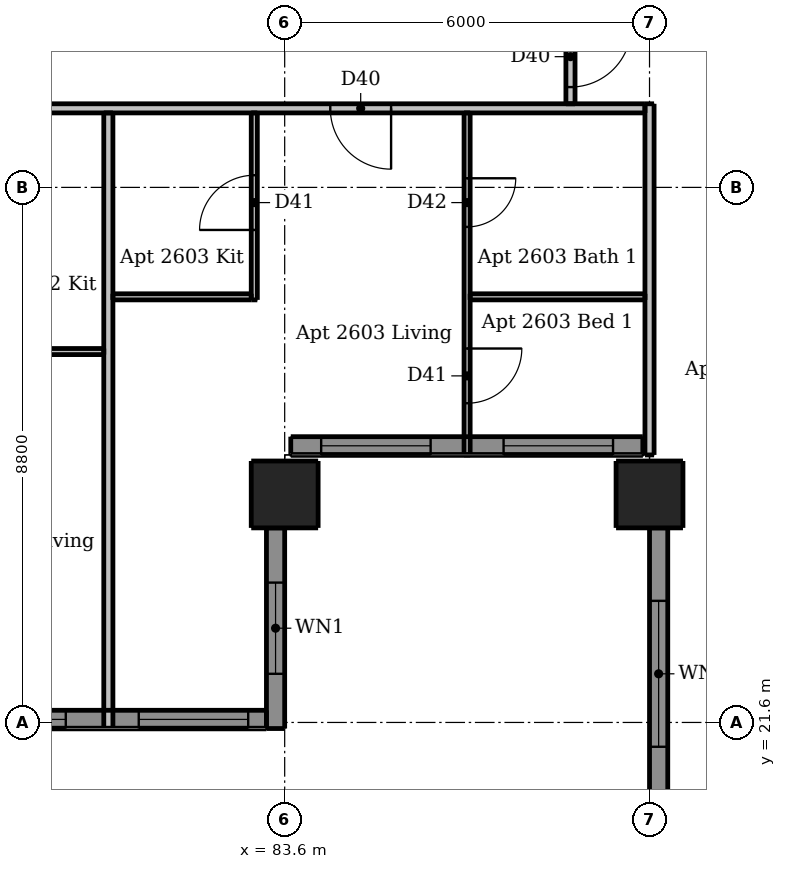
"""IFC4 building model, lengths in metres.
Left out: names, types, materials, properties, quantities, classifications, styles, units other than length and angle.
Written with IfcOpenShell. Run it as: python <this file> out.ifc"""

import sys

from ifc_helpers import new_model, si_unit, direction, frame, frame_2d, origin, origin_2d, place, context, subcontext, project, spatial, rectangle, extrude, element, fill, save


model = new_model("IFC4")
c1 = context("Model", 3, precision=1e-05, world=origin(), true_north=direction((0.0, 1.0)))
c2 = subcontext(c1, "Body", "Model", "MODEL_VIEW")
j1 = project(units=[si_unit("LENGTHUNIT", "METRE"), si_unit("PLANEANGLEUNIT", "RADIAN")], contexts=[c1])
p1 = place(None, origin())
s1 = spatial("IfcSite", under=j1, at=p1, CompositionType="ELEMENT")
p2 = place(p1, origin())
s2 = spatial("IfcBuilding", under=s1, at=p2, CompositionType="ELEMENT")
p3 = place(p2, frame((0.0, 0.0, 98.5)))
s3 = spatial("IfcBuildingStorey", under=s2, at=p3, CompositionType="ELEMENT", Elevation=98.5)
for number, where, z_axis, x_axis in (
    (1, (83.6, 25.35, 0.0), (0.0, 0.0, 1.0), (1.0, 0.0, 0.0)),
    (2, (89.6, 25.35, 0.0), (0.0, 0.0, 1.0), (1.0, 0.0, 0.0)),
):
    element("IfcColumn", number, at=place(p3, frame(where, z_axis=z_axis, x_axis=x_axis)), inside=s3, PredefinedType="COLUMN", context=c2, shape_type="SweptSolid", body=[
        extrude(rectangle(XDim=1.1, YDim=1.1, at=origin_2d()), origin(), (0.0, 0.0, 1.0), 3.05),
    ])
p4 = place(p3, frame((83.45, 21.5, 0.0), z_axis=(0.0, 0.0, 1.0), x_axis=(0.0, 1.0, 0.0)))
e3 = element("IfcWall", 3, at=p4, inside=s3, PredefinedType="SOLIDWALL", context=c2, shape_type="SweptSolid", body=[
    extrude(rectangle(XDim=3.3, YDim=0.3, at=frame_2d((1.65, 0.0))), origin(), (0.0, 0.0, 1.0), 3.05),
])
p5 = place(p4, frame((0.9, 0.0, 0.9)))
e4 = element("IfcOpeningElement", 4, at=p5, cuts=e3, PredefinedType="OPENING", context=c2, shape_type="SweptSolid", body=[
    extrude(rectangle(XDim=1.5, YDim=1.5, at=frame_2d((0.75, 0.75))), frame((0.0, 0.16, 0.0), z_axis=(0.0, -1.0, 0.0), x_axis=(1.0, 0.0, 0.0)), (0.0, 0.0, 1.0), 0.32),
])
p6 = place(p3, frame((89.75, 24.8, 0.0), z_axis=(0.0, 0.0, 1.0), x_axis=(0.0, -1.0, 0.0)))
e5 = element("IfcWall", 5, at=p6, inside=s3, PredefinedType="SOLIDWALL", context=c2, shape_type="SweptSolid", body=[
    extrude(rectangle(XDim=4.8, YDim=0.3, at=frame_2d((2.4, 0.0))), origin(), (0.0, 0.0, 1.0), 3.05),
])
p7 = place(p6, frame((1.2, 0.0, 0.15)))
e6 = element("IfcOpeningElement", 6, at=p7, cuts=e5, PredefinedType="OPENING", context=c2, shape_type="SweptSolid", body=[
    extrude(rectangle(XDim=2.4, YDim=2.1, at=frame_2d((1.2, 1.05))), frame((0.0, 0.16, 0.0), z_axis=(0.0, -1.0, 0.0), x_axis=(1.0, 0.0, 0.0)), (0.0, 0.0, 1.0), 0.32),
])
p8 = place(p3, frame((77.6, 21.65, 0.0), z_axis=(0.0, 0.0, 1.0), x_axis=(1.0, 0.0, 0.0)))
e7 = element("IfcWall", 7, at=p8, inside=s3, PredefinedType="SOLIDWALL", context=c2, shape_type="SweptSolid", body=[
    extrude(rectangle(XDim=5.7, YDim=0.3, at=frame_2d((2.85, 0.0))), origin(), (0.0, 0.0, 1.0), 3.05),
])
p9 = place(p8, frame((0.6, 0.0, 0.15)))
e8 = element("IfcOpeningElement", 8, at=p9, cuts=e7, PredefinedType="OPENING", context=c2, shape_type="SweptSolid", body=[
    extrude(rectangle(XDim=1.8, YDim=2.1, at=frame_2d((0.9, 1.05))), frame((0.0, 0.16, 0.0), z_axis=(0.0, -1.0, 0.0), x_axis=(1.0, 0.0, 0.0)), (0.0, 0.0, 1.0), 0.32),
])
p10 = place(p8, frame((3.6, 0.0, 0.15)))
e9 = element("IfcOpeningElement", 9, at=p10, cuts=e7, PredefinedType="OPENING", context=c2, shape_type="SweptSolid", body=[
    extrude(rectangle(XDim=1.8, YDim=2.1, at=frame_2d((0.9, 1.05))), frame((0.0, 0.16, 0.0), z_axis=(0.0, -1.0, 0.0), x_axis=(1.0, 0.0, 0.0)), (0.0, 0.0, 1.0), 0.32),
])
p11 = place(p3, frame((83.7, 26.15, 0.0), z_axis=(0.0, 0.0, 1.0), x_axis=(1.0, 0.0, 0.0)))
e10 = element("IfcWall", 10, at=p11, inside=s3, PredefinedType="SOLIDWALL", context=c2, shape_type="SweptSolid", body=[
    extrude(rectangle(XDim=5.79, YDim=0.3, at=frame_2d((2.895, 0.0))), origin(), (0.0, 0.0, 1.0), 3.05),
])
p12 = place(p11, frame((0.5, 0.0, 0.15)))
e11 = element("IfcOpeningElement", 11, at=p12, cuts=e10, PredefinedType="OPENING", context=c2, shape_type="SweptSolid", body=[
    extrude(rectangle(XDim=1.8, YDim=2.1, at=frame_2d((0.9, 1.05))), frame((0.0, 0.16, 0.0), z_axis=(0.0, -1.0, 0.0), x_axis=(1.0, 0.0, 0.0)), (0.0, 0.0, 1.0), 0.32),
])
p13 = place(p11, frame((3.5, 0.0, 0.15)))
e12 = element("IfcOpeningElement", 12, at=p13, cuts=e10, PredefinedType="OPENING", context=c2, shape_type="SweptSolid", body=[
    extrude(rectangle(XDim=1.8, YDim=2.1, at=frame_2d((0.9, 1.05))), frame((0.0, 0.16, 0.0), z_axis=(0.0, -1.0, 0.0), x_axis=(1.0, 0.0, 0.0)), (0.0, 0.0, 1.0), 0.32),
])
p14 = place(p3, frame((83.1, 28.55, 0.0), z_axis=(0.0, 0.0, 1.0), x_axis=(0.0, 1.0, 0.0)))
e13 = element("IfcWall", 13, at=p14, inside=s3, PredefinedType="PARTITIONING", context=c2, shape_type="SweptSolid", body=[
    extrude(rectangle(XDim=3.075, YDim=0.1, at=frame_2d((1.538, 0.0))), origin(), (0.0, 0.0, 1.0), 3.05),
])
p15 = place(p14, frame((1.15, 0.0, 0.0)))
e14 = element("IfcOpeningElement", 14, at=p15, cuts=e13, PredefinedType="OPENING", context=c2, shape_type="SweptSolid", body=[
    extrude(rectangle(XDim=0.9, YDim=2.1, at=frame_2d((0.45, 1.05))), frame((0.0, 0.06, 0.0), z_axis=(0.0, -1.0, 0.0), x_axis=(1.0, 0.0, 0.0)), (0.0, 0.0, 1.0), 0.12),
])
p16 = place(p3, frame((86.6, 31.625, 0.0), z_axis=(0.0, 0.0, 1.0), x_axis=(0.0, -1.0, 0.0)))
e15 = element("IfcWall", 15, at=p16, inside=s3, PredefinedType="PARTITIONING", context=c2, shape_type="SweptSolid", body=[
    extrude(rectangle(XDim=5.625, YDim=0.1, at=frame_2d((2.812, 0.0))), origin(), (0.0, 0.0, 1.0), 3.05),
])
p17 = place(p16, frame((3.875, 0.0, 0.0)))
e16 = element("IfcOpeningElement", 16, at=p17, cuts=e15, PredefinedType="OPENING", context=c2, shape_type="SweptSolid", body=[
    extrude(rectangle(XDim=0.9, YDim=2.1, at=frame_2d((0.45, 1.05))), frame((0.0, 0.06, 0.0), z_axis=(0.0, -1.0, 0.0), x_axis=(1.0, 0.0, 0.0)), (0.0, 0.0, 1.0), 0.12),
])
p18 = place(p16, frame((1.075, 0.0, 0.0)))
e17 = element("IfcOpeningElement", 17, at=p18, cuts=e15, PredefinedType="OPENING", context=c2, shape_type="SweptSolid", body=[
    extrude(rectangle(XDim=0.8, YDim=2.1, at=frame_2d((0.4, 1.05))), frame((0.0, 0.06, 0.0), z_axis=(0.0, -1.0, 0.0), x_axis=(1.0, 0.0, 0.0)), (0.0, 0.0, 1.0), 0.12),
])
p19 = place(p3, frame((80.775, 28.6, 0.0), z_axis=(0.0, 0.0, 1.0), x_axis=(1.0, 0.0, 0.0)))
e18 = element("IfcWall", 18, at=p19, inside=s3, PredefinedType="PARTITIONING", context=c2, shape_type="SweptSolid", body=[
    extrude(rectangle(XDim=2.275, YDim=0.1, at=frame_2d((1.138, 0.0))), origin(), (0.0, 0.0, 1.0), 3.05),
])
p20 = place(p3, frame((86.65, 28.6, 0.0), z_axis=(0.0, 0.0, 1.0), x_axis=(1.0, 0.0, 0.0)))
e19 = element("IfcWall", 19, at=p20, inside=s3, PredefinedType="PARTITIONING", context=c2, shape_type="SweptSolid", body=[
    extrude(rectangle(XDim=2.875, YDim=0.1, at=frame_2d((1.438, 0.0))), origin(), (0.0, 0.0, 1.0), 3.05),
])
p21 = place(p3, frame((78.35, 27.7, 0.0), z_axis=(0.0, 0.0, 1.0), x_axis=(1.0, 0.0, 0.0)))
e20 = element("IfcWall", 20, at=p21, inside=s3, PredefinedType="PARTITIONING", context=c2, shape_type="SweptSolid", body=[
    extrude(rectangle(XDim=2.275, YDim=0.1, at=frame_2d((1.137, 0.0))), origin(), (0.0, 0.0, 1.0), 3.05),
])
p22 = place(p3, frame((80.7, 21.5, 0.0), z_axis=(0.0, 0.0, 1.0), x_axis=(0.0, 1.0, 0.0)))
e21 = element("IfcWall", 21, at=p22, inside=s3, PredefinedType="PARTITIONING", context=c2, shape_type="SweptSolid", body=[
    extrude(rectangle(XDim=10.125, YDim=0.15, at=frame_2d((5.062, 0.0))), origin(), (0.0, 0.0, 1.0), 3.05),
])
p23 = place(p3, frame((88.3, 60.475, 0.0), z_axis=(0.0, 0.0, 1.0), x_axis=(0.0, -1.0, 0.0)))
e22 = element("IfcWall", 22, at=p23, inside=s3, PredefinedType="PARTITIONING", context=c2, shape_type="SweptSolid", body=[
    extrude(rectangle(XDim=28.7, YDim=0.15, at=frame_2d((14.35, 0.0))), origin(), (0.0, 0.0, 1.0), 3.05),
])
p24 = place(p23, frame((27.425, 0.0, 0.0)))
e23 = element("IfcOpeningElement", 23, at=p24, cuts=e22, PredefinedType="OPENING", context=c2, shape_type="SweptSolid", body=[
    extrude(rectangle(XDim=1.0, YDim=2.1, at=frame_2d((0.5, 1.05))), frame((0.0, 0.085, 0.0), z_axis=(0.0, -1.0, 0.0), x_axis=(1.0, 0.0, 0.0)), (0.0, 0.0, 1.0), 0.17),
])
p25 = place(p23, frame((14.575, 0.0, 0.0)))
e24 = element("IfcOpeningElement", 24, at=p25, cuts=e22, PredefinedType="OPENING", context=c2, shape_type="SweptSolid", body=[
    extrude(rectangle(XDim=1.0, YDim=2.1, at=frame_2d((0.5, 1.05))), frame((0.0, 0.085, 0.0), z_axis=(0.0, -1.0, 0.0), x_axis=(1.0, 0.0, 0.0)), (0.0, 0.0, 1.0), 0.17),
])
p26 = place(p23, frame((3.775, 0.0, 0.0)))
e25 = element("IfcOpeningElement", 25, at=p26, cuts=e22, PredefinedType="OPENING", context=c2, shape_type="SweptSolid", body=[
    extrude(rectangle(XDim=1.0, YDim=2.1, at=frame_2d((0.5, 1.05))), frame((0.0, 0.085, 0.0), z_axis=(0.0, -1.0, 0.0), x_axis=(1.0, 0.0, 0.0)), (0.0, 0.0, 1.0), 0.17),
])
p27 = place(p3, frame((89.6, 26.0, 0.0), z_axis=(0.0, 0.0, 1.0), x_axis=(0.0, 1.0, 0.0)))
e26 = element("IfcWall", 26, at=p27, inside=s3, PredefinedType="PARTITIONING", context=c2, shape_type="SweptSolid", body=[
    extrude(rectangle(XDim=5.775, YDim=0.15, at=frame_2d((2.887, 0.0))), origin(), (0.0, 0.0, 1.0), 2.516),
])
p28 = place(p3, frame((89.525, 31.7, 0.0), z_axis=(0.0, 0.0, 1.0), x_axis=(-1.0, 0.0, 0.0)))
e27 = element("IfcWall", 27, at=p28, inside=s3, PredefinedType="PARTITIONING", context=c2, shape_type="SweptSolid", body=[
    extrude(rectangle(XDim=28.75, YDim=0.15, at=frame_2d((14.375, 0.0))), origin(), (0.0, 0.0, 1.0), 3.05),
])
p29 = place(p28, frame((25.875, 0.0, 0.0)))
e28 = element("IfcOpeningElement", 28, at=p29, cuts=e27, PredefinedType="OPENING", context=c2, shape_type="SweptSolid", body=[
    extrude(rectangle(XDim=1.0, YDim=2.1, at=frame_2d((0.5, 1.05))), frame((0.0, 0.085, 0.0), z_axis=(0.0, -1.0, 0.0), x_axis=(1.0, 0.0, 0.0)), (0.0, 0.0, 1.0), 0.17),
])
p30 = place(p28, frame((12.525, 0.0, 0.0)))
e29 = element("IfcOpeningElement", 29, at=p30, cuts=e27, PredefinedType="OPENING", context=c2, shape_type="SweptSolid", body=[
    extrude(rectangle(XDim=1.0, YDim=2.1, at=frame_2d((0.5, 1.05))), frame((0.0, 0.085, 0.0), z_axis=(0.0, -1.0, 0.0), x_axis=(1.0, 0.0, 0.0)), (0.0, 0.0, 1.0), 0.17),
])
p31 = place(p28, frame((4.175, 0.0, 0.0)))
e30 = element("IfcOpeningElement", 30, at=p31, cuts=e27, PredefinedType="OPENING", context=c2, shape_type="SweptSolid", body=[
    extrude(rectangle(XDim=1.0, YDim=2.1, at=frame_2d((0.5, 1.05))), frame((0.0, 0.085, 0.0), z_axis=(0.0, -1.0, 0.0), x_axis=(1.0, 0.0, 0.0)), (0.0, 0.0, 1.0), 0.17),
])
p32 = place(p5, origin())
e31 = element("IfcWindow", 31, at=p32, inside=s3, PartitioningType="DOUBLE_PANEL_VERTICAL", PredefinedType="WINDOW", context=c2, shape_type="SweptSolid", body=[
    extrude(rectangle(XDim=1.5, YDim=1.5, at=frame_2d((0.75, 0.75))), frame((0.0, 0.03, 0.0), z_axis=(0.0, -1.0, 0.0), x_axis=(1.0, 0.0, 0.0)), (0.0, 0.0, 1.0), 0.06),
])
fill(e4, e31)
p33 = place(p7, origin())
e32 = element("IfcWindow", 32, at=p33, inside=s3, PartitioningType="DOUBLE_PANEL_VERTICAL", PredefinedType="WINDOW", context=c2, shape_type="SweptSolid", body=[
    extrude(rectangle(XDim=2.4, YDim=2.1, at=frame_2d((1.2, 1.05))), frame((0.0, 0.03, 0.0), z_axis=(0.0, -1.0, 0.0), x_axis=(1.0, 0.0, 0.0)), (0.0, 0.0, 1.0), 0.06),
])
fill(e6, e32)
p34 = place(p9, origin())
e33 = element("IfcWindow", 33, at=p34, inside=s3, PartitioningType="DOUBLE_PANEL_VERTICAL", PredefinedType="WINDOW", context=c2, shape_type="SweptSolid", body=[
    extrude(rectangle(XDim=1.8, YDim=2.1, at=frame_2d((0.9, 1.05))), frame((0.0, 0.03, 0.0), z_axis=(0.0, -1.0, 0.0), x_axis=(1.0, 0.0, 0.0)), (0.0, 0.0, 1.0), 0.06),
])
fill(e8, e33)
p35 = place(p10, origin())
e34 = element("IfcWindow", 34, at=p35, inside=s3, PartitioningType="DOUBLE_PANEL_VERTICAL", PredefinedType="WINDOW", context=c2, shape_type="SweptSolid", body=[
    extrude(rectangle(XDim=1.8, YDim=2.1, at=frame_2d((0.9, 1.05))), frame((0.0, 0.03, 0.0), z_axis=(0.0, -1.0, 0.0), x_axis=(1.0, 0.0, 0.0)), (0.0, 0.0, 1.0), 0.06),
])
fill(e9, e34)
p36 = place(p12, origin())
e35 = element("IfcWindow", 35, at=p36, inside=s3, PartitioningType="DOUBLE_PANEL_VERTICAL", PredefinedType="WINDOW", context=c2, shape_type="SweptSolid", body=[
    extrude(rectangle(XDim=1.8, YDim=2.1, at=frame_2d((0.9, 1.05))), frame((0.0, 0.03, 0.0), z_axis=(0.0, -1.0, 0.0), x_axis=(1.0, 0.0, 0.0)), (0.0, 0.0, 1.0), 0.06),
])
fill(e11, e35)
p37 = place(p13, origin())
e36 = element("IfcWindow", 36, at=p37, inside=s3, PartitioningType="DOUBLE_PANEL_VERTICAL", PredefinedType="WINDOW", context=c2, shape_type="SweptSolid", body=[
    extrude(rectangle(XDim=1.8, YDim=2.1, at=frame_2d((0.9, 1.05))), frame((0.0, 0.03, 0.0), z_axis=(0.0, -1.0, 0.0), x_axis=(1.0, 0.0, 0.0)), (0.0, 0.0, 1.0), 0.06),
])
fill(e12, e36)
p38 = place(p31, origin())
e37 = element("IfcDoor", 37, at=p38, inside=s3, OperationType="SINGLE_SWING_LEFT", PredefinedType="DOOR", context=c2, shape_type="SweptSolid", body=[
    extrude(rectangle(XDim=1.0, YDim=2.1, at=frame_2d((0.5, 1.05))), frame((0.0, 0.025, 0.0), z_axis=(0.0, -1.0, 0.0), x_axis=(1.0, 0.0, 0.0)), (0.0, 0.0, 1.0), 0.05),
])
fill(e30, e37)
p39 = place(p15, origin())
e38 = element("IfcDoor", 38, at=p39, inside=s3, OperationType="SINGLE_SWING_LEFT", PredefinedType="DOOR", context=c2, shape_type="SweptSolid", body=[
    extrude(rectangle(XDim=0.9, YDim=2.1, at=frame_2d((0.45, 1.05))), frame((0.0, 0.025, 0.0), z_axis=(0.0, -1.0, 0.0), x_axis=(1.0, 0.0, 0.0)), (0.0, 0.0, 1.0), 0.05),
])
fill(e14, e38)
p40 = place(p17, origin())
e39 = element("IfcDoor", 39, at=p40, inside=s3, OperationType="SINGLE_SWING_LEFT", PredefinedType="DOOR", context=c2, shape_type="SweptSolid", body=[
    extrude(rectangle(XDim=0.9, YDim=2.1, at=frame_2d((0.45, 1.05))), frame((0.0, 0.025, 0.0), z_axis=(0.0, -1.0, 0.0), x_axis=(1.0, 0.0, 0.0)), (0.0, 0.0, 1.0), 0.05),
])
fill(e16, e39)
p41 = place(p18, origin())
e40 = element("IfcDoor", 40, at=p41, inside=s3, OperationType="SINGLE_SWING_LEFT", PredefinedType="DOOR", context=c2, shape_type="SweptSolid", body=[
    extrude(rectangle(XDim=0.8, YDim=2.1, at=frame_2d((0.4, 1.05))), frame((0.0, 0.025, 0.0), z_axis=(0.0, -1.0, 0.0), x_axis=(1.0, 0.0, 0.0)), (0.0, 0.0, 1.0), 0.05),
])
fill(e17, e40)
p42 = place(p24, origin())
e41 = element("IfcDoor", 41, at=p42, inside=s3, OperationType="SINGLE_SWING_LEFT", PredefinedType="DOOR", context=c2, shape_type="SweptSolid", body=[
    extrude(rectangle(XDim=1.0, YDim=2.1, at=frame_2d((0.5, 1.05))), frame((0.0, 0.025, 0.0), z_axis=(0.0, -1.0, 0.0), x_axis=(1.0, 0.0, 0.0)), (0.0, 0.0, 1.0), 0.05),
])
fill(e23, e41)
save(model, sys.argv[1])
